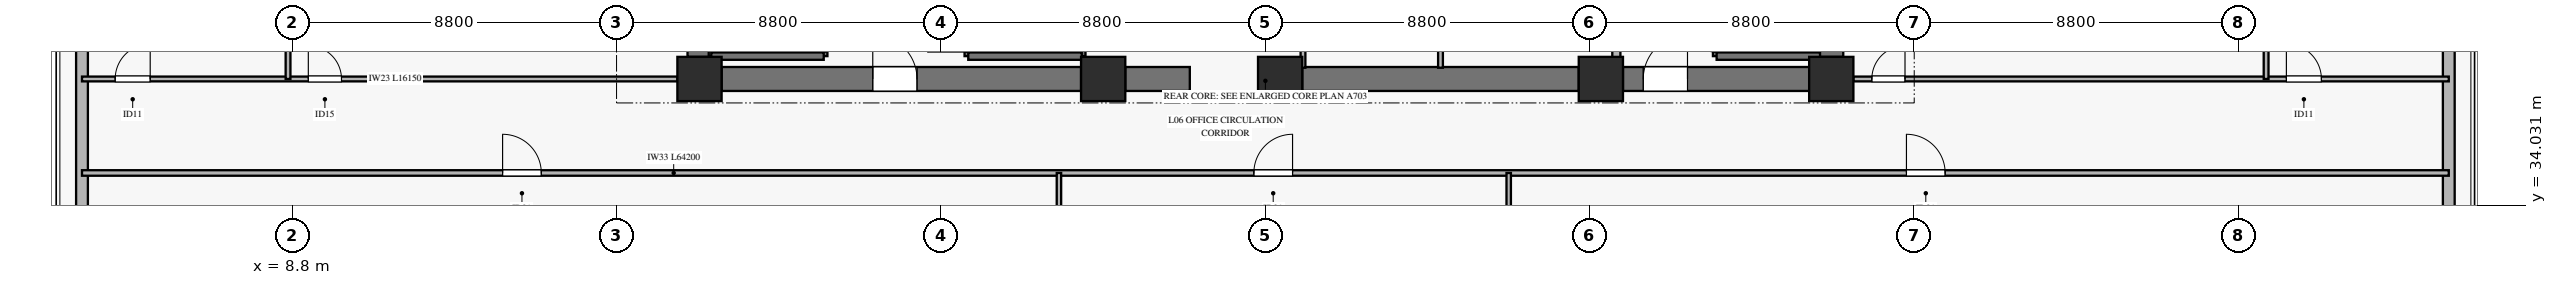
"""IFC4 building model, lengths in metres.
Left out: names, types, materials, properties, quantities, classifications, styles, units other than length and angle.
Written with IfcOpenShell. Run it as: python <this file> out.ifc"""

import sys

from ifc_helpers import new_model, si_unit, direction, frame, frame_2d, origin, origin_2d, place, context, subcontext, project, spatial, rectangle, extrude, source, transform, mapped, element, fill, save


model = new_model("IFC4")
c1 = context("Model", 3, precision=1e-05, world=origin(), true_north=direction((0.0, 1.0)))
c2 = subcontext(c1, "Body", "Model", "MODEL_VIEW")
j1 = project(units=[si_unit("LENGTHUNIT", "METRE"), si_unit("PLANEANGLEUNIT", "RADIAN")], contexts=[c1])
p1 = place(None, origin())
s1 = spatial("IfcSite", under=j1, at=p1, CompositionType="ELEMENT")
p2 = place(p1, origin())
s2 = spatial("IfcBuilding", under=s1, at=p2, CompositionType="ELEMENT")
p3 = place(p2, frame((0.0, 0.0, 25.4)))
s3 = spatial("IfcBuildingStorey", under=s2, at=p3, CompositionType="ELEMENT", Elevation=25.4)
m1 = source(origin(), c2, "Body", "SweptSolid", [
    extrude(rectangle(XDim=1.2, YDim=1.2, at=origin_2d()), origin(), (0.0, 0.0, 1.0), 3.68),
])
for number, where, z_axis, x_axis in (
    (1, (19.85, 37.45, 0.0), (0.0, 0.0, 1.0), (1.0, 0.0, 0.0)),
    (2, (30.8, 37.45, 0.0), (0.0, 0.0, 1.0), (1.0, 0.0, 0.0)),
    (3, (35.6, 37.45, 0.0), (0.0, 0.0, 1.0), (1.0, 0.0, 0.0)),
    (4, (44.3, 37.45, 0.0), (0.0, 0.0, 1.0), (1.0, 0.0, 0.0)),
    (5, (50.55, 37.45, 0.0), (0.0, 0.0, 1.0), (1.0, 0.0, 0.0)),
):
    element("IfcColumn", number, at=place(p3, frame(where, z_axis=z_axis, x_axis=x_axis)), inside=s3, PredefinedType="PILASTER", context=c2, shape_type="MappedRepresentation", body=[
        mapped(m1, transform((0.0, 0.0, 0.0), x_axis=(1.0, 0.0, 0.0), y_axis=(0.0, 1.0, 0.0), z_axis=(0.0, 0.0, 1.0), scale=1.0)),
    ])
p4 = place(p3, frame((20.45, 37.45, 0.0), z_axis=(0.0, 0.0, 1.0), x_axis=(1.0, 0.0, 0.0)))
e6 = element("IfcWall", 6, at=p4, inside=s3, PredefinedType="SHEAR", context=c2, shape_type="SweptSolid", body=[
    extrude(rectangle(XDim=9.75, YDim=0.65, at=frame_2d((4.875, 0.0))), origin(), (0.0, 0.0, 1.0), 3.68),
])
p5 = place(p4, frame((4.1, 0.0, 0.0)))
e7 = element("IfcOpeningElement", 7, at=p5, cuts=e6, PredefinedType="OPENING", context=c2, shape_type="SweptSolid", body=[
    extrude(rectangle(XDim=1.2, YDim=2.15, at=frame_2d((0.6, 1.075))), frame((0.0, 0.335, 0.0), z_axis=(0.0, -1.0, 0.0), x_axis=(1.0, 0.0, 0.0)), (0.0, 0.0, 1.0), 0.67),
])
p6 = place(p3, frame((31.4, 37.45, 0.0), z_axis=(0.0, 0.0, 1.0), x_axis=(1.0, 0.0, 0.0)))
e8 = element("IfcWall", 8, at=p6, inside=s3, PredefinedType="SHEAR", context=c2, shape_type="SweptSolid", body=[
    extrude(rectangle(XDim=1.75, YDim=0.65, at=frame_2d((0.875, 0.0))), origin(), (0.0, 0.0, 1.0), 3.68),
])
p7 = place(p3, frame((36.2, 37.45, 0.0), z_axis=(0.0, 0.0, 1.0), x_axis=(1.0, 0.0, 0.0)))
e9 = element("IfcWall", 9, at=p7, inside=s3, PredefinedType="SHEAR", context=c2, shape_type="SweptSolid", body=[
    extrude(rectangle(XDim=7.5, YDim=0.65, at=frame_2d((3.75, 0.0))), origin(), (0.0, 0.0, 1.0), 3.68),
])
p8 = place(p3, frame((44.9, 37.45, 0.0), z_axis=(0.0, 0.0, 1.0), x_axis=(1.0, 0.0, 0.0)))
e10 = element("IfcWall", 10, at=p8, inside=s3, PredefinedType="SHEAR", context=c2, shape_type="SweptSolid", body=[
    extrude(rectangle(XDim=5.05, YDim=0.65, at=frame_2d((2.525, 0.0))), origin(), (0.0, 0.0, 1.0), 3.68),
])
p9 = place(p8, frame((0.55, 0.0, 0.0)))
e11 = element("IfcOpeningElement", 11, at=p9, cuts=e10, PredefinedType="OPENING", context=c2, shape_type="SweptSolid", body=[
    extrude(rectangle(XDim=1.2, YDim=2.15, at=frame_2d((0.6, 1.075))), frame((0.0, 0.335, 0.0), z_axis=(0.0, -1.0, 0.0), x_axis=(1.0, 0.0, 0.0)), (0.0, 0.0, 1.0), 0.67),
])
for number, where, z_axis, x_axis in (
    (12, (19.85, 38.05, 0.0), (0.0, 0.0, 1.0), (0.0, 1.0, 0.0)),
    (13, (50.55, 38.05, 0.0), (0.0, 0.0, 1.0), (0.0, 1.0, 0.0)),
):
    element("IfcWall", number, at=place(p3, frame(where, z_axis=z_axis, x_axis=x_axis)), inside=s3, PredefinedType="SHEAR", context=c2, shape_type="SweptSolid", body=[
        extrude(rectangle(XDim=7.9, YDim=0.65, at=frame_2d((3.95, 0.0))), origin(), (0.0, 0.0, 1.0), 3.68),
    ])
p10 = place(p3, frame((3.1, 25.25, 0.0), z_axis=(0.0, 0.0, 1.0), x_axis=(0.0, 1.0, 0.0)))
e14 = element("IfcWall", 14, at=p10, inside=s3, PredefinedType="SOLIDWALL", context=c2, shape_type="SweptSolid", body=[
    extrude(rectangle(XDim=17.65, YDim=0.32, at=frame_2d((8.825, 0.0))), origin(), (0.0, 0.0, 1.0), 3.16),
])
p11 = place(p10, frame((4.436, 0.0, 0.45)))
e15 = element("IfcOpeningElement", 15, at=p11, cuts=e14, PredefinedType="OPENING", context=c2, shape_type="SweptSolid", body=[
    extrude(rectangle(XDim=2.4, YDim=2.1, at=frame_2d((1.2, 1.05))), frame((0.0, 0.17, 0.0), z_axis=(0.0, -1.0, 0.0), x_axis=(1.0, 0.0, 0.0)), (0.0, 0.0, 1.0), 0.34),
])
p12 = place(p3, frame((67.3, 25.25, 0.0), z_axis=(0.0, 0.0, 1.0), x_axis=(0.0, 1.0, 0.0)))
e16 = element("IfcWall", 16, at=p12, inside=s3, PredefinedType="SOLIDWALL", context=c2, shape_type="SweptSolid", body=[
    extrude(rectangle(XDim=17.65, YDim=0.32, at=frame_2d((8.825, 0.0))), origin(), (0.0, 0.0, 1.0), 3.16),
])
p13 = place(p12, frame((4.436, 0.0, 0.45)))
e17 = element("IfcOpeningElement", 17, at=p13, cuts=e16, PredefinedType="OPENING", context=c2, shape_type="SweptSolid", body=[
    extrude(rectangle(XDim=2.4, YDim=2.1, at=frame_2d((1.2, 1.05))), frame((0.0, 0.17, 0.0), z_axis=(0.0, -1.0, 0.0), x_axis=(1.0, 0.0, 0.0)), (0.0, 0.0, 1.0), 0.34),
])
p14 = place(p3, frame((20.17, 38.07, 0.0), z_axis=(0.0, 0.0, 1.0), x_axis=(0.0, 1.0, 0.0)))
e18 = element("IfcWall", 18, at=p14, inside=s3, PredefinedType="SOLIDWALL", context=c2, shape_type="SweptSolid", body=[
    extrude(rectangle(XDim=7.25, YDim=0.14, at=frame_2d((3.625, 0.0))), origin(), (0.0, 0.0, 1.0), 3.9),
])
p15 = place(p3, frame((23.22, 38.07, 0.0), z_axis=(0.0, 0.0, 1.0), x_axis=(0.0, 1.0, 0.0)))
e19 = element("IfcWall", 19, at=p15, inside=s3, PredefinedType="SOLIDWALL", context=c2, shape_type="SweptSolid", body=[
    extrude(rectangle(XDim=7.25, YDim=0.2, at=frame_2d((3.625, 0.0))), origin(), (0.0, 0.0, 1.0), 3.9),
])
p16 = place(p15, frame((0.11, 0.0, 0.0)))
e20 = element("IfcOpeningElement", 20, at=p16, cuts=e19, PredefinedType="OPENING", context=c2, shape_type="SweptSolid", body=[
    extrude(rectangle(XDim=1.1, YDim=2.15, at=frame_2d((0.55, 1.075))), frame((0.0, 0.11, 0.0), z_axis=(0.0, -1.0, 0.0), x_axis=(1.0, 0.0, 0.0)), (0.0, 0.0, 1.0), 0.22),
])
p17 = place(p3, frame((20.17, 38.07, 0.0), z_axis=(0.0, 0.0, 1.0), x_axis=(1.0, 0.0, 0.0)))
e21 = element("IfcWall", 21, at=p17, inside=s3, PredefinedType="SOLIDWALL", context=c2, shape_type="SweptSolid", body=[
    extrude(rectangle(XDim=3.05, YDim=0.2, at=frame_2d((1.525, 0.0))), origin(), (0.0, 0.0, 1.0), 3.9),
])
p18 = place(p3, frame((27.14, 38.07, 0.0), z_axis=(0.0, 0.0, 1.0), x_axis=(0.0, 1.0, 0.0)))
e22 = element("IfcWall", 22, at=p18, inside=s3, PredefinedType="SOLIDWALL", context=c2, shape_type="SweptSolid", body=[
    extrude(rectangle(XDim=7.25, YDim=0.2, at=frame_2d((3.625, 0.0))), origin(), (0.0, 0.0, 1.0), 3.9),
])
p19 = place(p18, frame((0.11, 0.0, 0.0)))
e23 = element("IfcOpeningElement", 23, at=p19, cuts=e22, PredefinedType="OPENING", context=c2, shape_type="SweptSolid", body=[
    extrude(rectangle(XDim=1.1, YDim=2.15, at=frame_2d((0.55, 1.075))), frame((0.0, 0.11, 0.0), z_axis=(0.0, -1.0, 0.0), x_axis=(1.0, 0.0, 0.0)), (0.0, 0.0, 1.0), 0.22),
])
p20 = place(p3, frame((30.22, 38.07, 0.0), z_axis=(0.0, 0.0, 1.0), x_axis=(0.0, 1.0, 0.0)))
e24 = element("IfcWall", 24, at=p20, inside=s3, PredefinedType="SOLIDWALL", context=c2, shape_type="SweptSolid", body=[
    extrude(rectangle(XDim=7.25, YDim=0.2, at=frame_2d((3.625, 0.0))), origin(), (0.0, 0.0, 1.0), 3.9),
])
p21 = place(p3, frame((27.14, 38.07, 0.0), z_axis=(0.0, 0.0, 1.0), x_axis=(1.0, 0.0, 0.0)))
e25 = element("IfcWall", 25, at=p21, inside=s3, PredefinedType="SOLIDWALL", context=c2, shape_type="SweptSolid", body=[
    extrude(rectangle(XDim=3.08, YDim=0.2, at=frame_2d((1.54, 0.0))), origin(), (0.0, 0.0, 1.0), 3.9),
])
p22 = place(p3, frame((47.44, 38.07, 0.0), z_axis=(0.0, 0.0, 1.0), x_axis=(0.0, 1.0, 0.0)))
e26 = element("IfcWall", 26, at=p22, inside=s3, PredefinedType="SOLIDWALL", context=c2, shape_type="SweptSolid", body=[
    extrude(rectangle(XDim=7.25, YDim=0.2, at=frame_2d((3.625, 0.0))), origin(), (0.0, 0.0, 1.0), 3.9),
])
p23 = place(p22, frame((0.11, 0.0, 0.0)))
e27 = element("IfcOpeningElement", 27, at=p23, cuts=e26, PredefinedType="OPENING", context=c2, shape_type="SweptSolid", body=[
    extrude(rectangle(XDim=1.1, YDim=2.15, at=frame_2d((0.55, 1.075))), frame((0.0, 0.11, 0.0), z_axis=(0.0, -1.0, 0.0), x_axis=(1.0, 0.0, 0.0)), (0.0, 0.0, 1.0), 0.22),
])
p24 = place(p3, frame((47.44, 38.07, 0.0), z_axis=(0.0, 0.0, 1.0), x_axis=(1.0, 0.0, 0.0)))
e28 = element("IfcWall", 28, at=p24, inside=s3, PredefinedType="SOLIDWALL", context=c2, shape_type="SweptSolid", body=[
    extrude(rectangle(XDim=2.805, YDim=0.2, at=frame_2d((1.403, 0.0))), origin(), (0.0, 0.0, 1.0), 3.9),
])
p25 = place(p3, frame((44.72, 37.755, 0.0), z_axis=(0.0, 0.0, 1.0), x_axis=(0.0, 1.0, 0.0)))
e29 = element("IfcWall", 29, at=p25, inside=s3, PredefinedType="SOLIDWALL", context=c2, shape_type="SweptSolid", body=[
    extrude(rectangle(XDim=7.465, YDim=0.22, at=frame_2d((3.732, 0.0))), origin(), (0.0, 0.0, 1.0), 3.68),
])
p26 = place(p3, frame((36.22, 37.755, 0.0), z_axis=(0.0, 0.0, 1.0), x_axis=(0.0, 1.0, 0.0)))
e30 = element("IfcWall", 30, at=p26, inside=s3, PredefinedType="PARTITIONING", context=c2, shape_type="SweptSolid", body=[
    extrude(rectangle(XDim=2.165, YDim=0.13, at=frame_2d((1.083, 0.0))), origin(), (0.0, 0.0, 1.0), 3.68),
])
p27 = place(p26, frame((0.855, 0.0, 0.0)))
e31 = element("IfcOpeningElement", 31, at=p27, cuts=e30, PredefinedType="OPENING", context=c2, shape_type="SweptSolid", body=[
    extrude(rectangle(XDim=0.9, YDim=2.1, at=frame_2d((0.45, 1.05))), frame((0.0, 0.075, 0.0), z_axis=(0.0, -1.0, 0.0), x_axis=(1.0, 0.0, 0.0)), (0.0, 0.0, 1.0), 0.15),
])
p28 = place(p3, frame((39.95, 37.755, 0.0), z_axis=(0.0, 0.0, 1.0), x_axis=(0.0, 1.0, 0.0)))
e32 = element("IfcWall", 32, at=p28, inside=s3, PredefinedType="PARTITIONING", context=c2, shape_type="SweptSolid", body=[
    extrude(rectangle(XDim=2.165, YDim=0.13, at=frame_2d((1.083, 0.0))), origin(), (0.0, 0.0, 1.0), 3.68),
])
p29 = place(p28, frame((0.565, 0.0, 0.0)))
e33 = element("IfcOpeningElement", 33, at=p29, cuts=e32, PredefinedType="OPENING", context=c2, shape_type="SweptSolid", body=[
    extrude(rectangle(XDim=0.9, YDim=2.1, at=frame_2d((0.45, 1.05))), frame((0.0, 0.075, 0.0), z_axis=(0.0, -1.0, 0.0), x_axis=(1.0, 0.0, 0.0)), (0.0, 0.0, 1.0), 0.15),
])
p30 = place(p3, frame((3.1, 34.9, 0.0), z_axis=(0.0, 0.0, 1.0), x_axis=(1.0, 0.0, 0.0)))
e34 = element("IfcWall", 34, at=p30, inside=s3, PredefinedType="PARTITIONING", context=c2, shape_type="SweptSolid", body=[
    extrude(rectangle(XDim=64.2, YDim=0.15, at=frame_2d((32.1, 0.0))), origin(), (0.0, 0.0, 1.0), 2.765),
])
p31 = place(p30, frame((11.409, 0.0, 0.0)))
e35 = element("IfcOpeningElement", 35, at=p31, cuts=e34, PredefinedType="OPENING", context=c2, shape_type="SweptSolid", body=[
    extrude(rectangle(XDim=1.05, YDim=2.15, at=frame_2d((0.525, 1.075))), frame((0.0, 0.085, 0.0), z_axis=(0.0, -1.0, 0.0), x_axis=(1.0, 0.0, 0.0)), (0.0, 0.0, 1.0), 0.17),
])
p32 = place(p30, frame((31.787, 0.0, 0.0)))
e36 = element("IfcOpeningElement", 36, at=p32, cuts=e34, PredefinedType="OPENING", context=c2, shape_type="SweptSolid", body=[
    extrude(rectangle(XDim=1.05, YDim=2.15, at=frame_2d((0.525, 1.075))), frame((0.0, 0.085, 0.0), z_axis=(0.0, -1.0, 0.0), x_axis=(1.0, 0.0, 0.0)), (0.0, 0.0, 1.0), 0.17),
])
p33 = place(p30, frame((49.489, 0.0, 0.0)))
e37 = element("IfcOpeningElement", 37, at=p33, cuts=e34, PredefinedType="OPENING", context=c2, shape_type="SweptSolid", body=[
    extrude(rectangle(XDim=1.05, YDim=2.15, at=frame_2d((0.525, 1.075))), frame((0.0, 0.085, 0.0), z_axis=(0.0, -1.0, 0.0), x_axis=(1.0, 0.0, 0.0)), (0.0, 0.0, 1.0), 0.17),
])
for number, where, z_axis, x_axis in (
    (38, (29.6, 3.3, 0.0), (0.0, 0.0, 1.0), (0.0, 1.0, 0.0)),
    (39, (41.8, 3.3, 0.0), (0.0, 0.0, 1.0), (0.0, 1.0, 0.0)),
):
    element("IfcWall", number, at=place(p3, frame(where, z_axis=z_axis, x_axis=x_axis)), inside=s3, PredefinedType="PARTITIONING", context=c2, shape_type="SweptSolid", body=[
        extrude(rectangle(XDim=31.6, YDim=0.12, at=frame_2d((15.8, 0.0))), origin(), (0.0, 0.0, 1.0), 3.165),
    ])
p34 = place(p3, frame((3.1, 37.45, 0.0), z_axis=(0.0, 0.0, 1.0), x_axis=(1.0, 0.0, 0.0)))
e40 = element("IfcWall", 40, at=p34, inside=s3, PredefinedType="PARTITIONING", context=c2, shape_type="SweptSolid", body=[
    extrude(rectangle(XDim=16.15, YDim=0.13, at=frame_2d((8.075, 0.0))), origin(), (0.0, 0.0, 1.0), 3.165),
])
p35 = place(p34, frame((0.9, 0.0, 0.0)))
e41 = element("IfcOpeningElement", 41, at=p35, cuts=e40, PredefinedType="OPENING", context=c2, shape_type="SweptSolid", body=[
    extrude(rectangle(XDim=0.95, YDim=2.1, at=frame_2d((0.475, 1.05))), frame((0.0, 0.075, 0.0), z_axis=(0.0, -1.0, 0.0), x_axis=(1.0, 0.0, 0.0)), (0.0, 0.0, 1.0), 0.15),
])
p36 = place(p34, frame((6.139, 0.0, 0.0)))
e42 = element("IfcOpeningElement", 42, at=p36, cuts=e40, PredefinedType="OPENING", context=c2, shape_type="SweptSolid", body=[
    extrude(rectangle(XDim=0.9, YDim=2.1, at=frame_2d((0.45, 1.05))), frame((0.0, 0.075, 0.0), z_axis=(0.0, -1.0, 0.0), x_axis=(1.0, 0.0, 0.0)), (0.0, 0.0, 1.0), 0.15),
])
p37 = place(p3, frame((8.689, 37.45, 0.0), z_axis=(0.0, 0.0, 1.0), x_axis=(0.0, 1.0, 0.0)))
e43 = element("IfcWall", 43, at=p37, inside=s3, PredefinedType="PARTITIONING", context=c2, shape_type="SweptSolid", body=[
    extrude(rectangle(XDim=8.8, YDim=0.13, at=frame_2d((4.4, 0.0))), origin(), (0.0, 0.0, 1.0), 3.68),
])
p38 = place(p3, frame((51.15, 37.45, 0.0), z_axis=(0.0, 0.0, 1.0), x_axis=(1.0, 0.0, 0.0)))
e44 = element("IfcWall", 44, at=p38, inside=s3, PredefinedType="PARTITIONING", context=c2, shape_type="SweptSolid", body=[
    extrude(rectangle(XDim=16.15, YDim=0.13, at=frame_2d((8.075, 0.0))), origin(), (0.0, 0.0, 1.0), 3.165),
])
p39 = place(p38, frame((0.5, 0.0, 0.0)))
e45 = element("IfcOpeningElement", 45, at=p39, cuts=e44, PredefinedType="OPENING", context=c2, shape_type="SweptSolid", body=[
    extrude(rectangle(XDim=0.9, YDim=2.1, at=frame_2d((0.45, 1.05))), frame((0.0, 0.075, 0.0), z_axis=(0.0, -1.0, 0.0), x_axis=(1.0, 0.0, 0.0)), (0.0, 0.0, 1.0), 0.15),
])
p40 = place(p38, frame((11.745, 0.0, 0.0)))
e46 = element("IfcOpeningElement", 46, at=p40, cuts=e44, PredefinedType="OPENING", context=c2, shape_type="SweptSolid", body=[
    extrude(rectangle(XDim=0.95, YDim=2.1, at=frame_2d((0.475, 1.05))), frame((0.0, 0.075, 0.0), z_axis=(0.0, -1.0, 0.0), x_axis=(1.0, 0.0, 0.0)), (0.0, 0.0, 1.0), 0.15),
])
p41 = place(p3, frame((62.345, 37.45, 0.0), z_axis=(0.0, 0.0, 1.0), x_axis=(0.0, 1.0, 0.0)))
e47 = element("IfcWall", 47, at=p41, inside=s3, PredefinedType="PARTITIONING", context=c2, shape_type="SweptSolid", body=[
    extrude(rectangle(XDim=8.8, YDim=0.13, at=frame_2d((4.4, 0.0))), origin(), (0.0, 0.0, 1.0), 3.68),
])
m2 = source(origin(), c2, "Body", "SweptSolid", [
    extrude(rectangle(XDim=1.2, YDim=2.15, at=frame_2d((0.6, 1.075))), frame((0.0, 0.025, 0.0), z_axis=(0.0, -1.0, 0.0), x_axis=(1.0, 0.0, 0.0)), (0.0, 0.0, 1.0), 0.05),
])
p42 = place(p5, origin())
e48 = element("IfcDoor", 48, at=p42, inside=s3, OperationType="SINGLE_SWING_LEFT", PredefinedType="DOOR", context=c2, shape_type="MappedRepresentation", body=[
    mapped(m2, transform((0.0, 0.0, 0.0), x_axis=(1.0, 0.0, 0.0), y_axis=(0.0, 1.0, 0.0), z_axis=(0.0, 0.0, 1.0), scale=1.0)),
])
fill(e7, e48)
p43 = place(p9, origin())
e49 = element("IfcDoor", 49, at=p43, inside=s3, OperationType="SINGLE_SWING_RIGHT", PredefinedType="DOOR", context=c2, shape_type="MappedRepresentation", body=[
    mapped(m2, transform((0.0, 0.0, 0.0), x_axis=(1.0, 0.0, 0.0), y_axis=(0.0, 1.0, 0.0), z_axis=(0.0, 0.0, 1.0), scale=1.0)),
])
fill(e11, e49)
m3 = source(origin(), c2, "Body", "SweptSolid", [
    extrude(rectangle(XDim=1.05, YDim=2.15, at=frame_2d((0.525, 1.075))), frame((0.0, 0.025, 0.0), z_axis=(0.0, -1.0, 0.0), x_axis=(1.0, 0.0, 0.0)), (0.0, 0.0, 1.0), 0.05),
])
p44 = place(p31, origin())
e50 = element("IfcDoor", 50, at=p44, inside=s3, OperationType="SINGLE_SWING_LEFT", PredefinedType="DOOR", context=c2, shape_type="MappedRepresentation", body=[
    mapped(m3, transform((0.0, 0.0, 0.0), x_axis=(1.0, 0.0, 0.0), y_axis=(0.0, 1.0, 0.0), z_axis=(0.0, 0.0, 1.0), scale=1.0)),
])
fill(e35, e50)
p45 = place(p32, origin())
e51 = element("IfcDoor", 51, at=p45, inside=s3, OperationType="SINGLE_SWING_RIGHT", PredefinedType="DOOR", context=c2, shape_type="MappedRepresentation", body=[
    mapped(m3, transform((0.0, 0.0, 0.0), x_axis=(1.0, 0.0, 0.0), y_axis=(0.0, 1.0, 0.0), z_axis=(0.0, 0.0, 1.0), scale=1.0)),
])
fill(e36, e51)
p46 = place(p33, origin())
e52 = element("IfcDoor", 52, at=p46, inside=s3, OperationType="SINGLE_SWING_LEFT", PredefinedType="DOOR", context=c2, shape_type="MappedRepresentation", body=[
    mapped(m3, transform((0.0, 0.0, 0.0), x_axis=(1.0, 0.0, 0.0), y_axis=(0.0, 1.0, 0.0), z_axis=(0.0, 0.0, 1.0), scale=1.0)),
])
fill(e37, e52)
m4 = source(origin(), c2, "Body", "SweptSolid", [
    extrude(rectangle(XDim=0.95, YDim=2.1, at=frame_2d((0.475, 1.05))), frame((0.0, 0.025, 0.0), z_axis=(0.0, -1.0, 0.0), x_axis=(1.0, 0.0, 0.0)), (0.0, 0.0, 1.0), 0.05),
])
p47 = place(p35, origin())
e53 = element("IfcDoor", 53, at=p47, inside=s3, OperationType="SINGLE_SWING_RIGHT", PredefinedType="DOOR", context=c2, shape_type="MappedRepresentation", body=[
    mapped(m4, transform((0.0, 0.0, 0.0), x_axis=(1.0, 0.0, 0.0), y_axis=(0.0, 1.0, 0.0), z_axis=(0.0, 0.0, 1.0), scale=1.0)),
])
fill(e41, e53)
m5 = source(origin(), c2, "Body", "SweptSolid", [
    extrude(rectangle(XDim=0.9, YDim=2.1, at=frame_2d((0.45, 1.05))), frame((0.0, 0.025, 0.0), z_axis=(0.0, -1.0, 0.0), x_axis=(1.0, 0.0, 0.0)), (0.0, 0.0, 1.0), 0.05),
])
p48 = place(p36, origin())
e54 = element("IfcDoor", 54, at=p48, inside=s3, OperationType="SINGLE_SWING_LEFT", PredefinedType="DOOR", context=c2, shape_type="MappedRepresentation", body=[
    mapped(m5, transform((0.0, 0.0, 0.0), x_axis=(1.0, 0.0, 0.0), y_axis=(0.0, 1.0, 0.0), z_axis=(0.0, 0.0, 1.0), scale=1.0)),
])
fill(e42, e54)
p49 = place(p39, origin())
e55 = element("IfcDoor", 55, at=p49, inside=s3, OperationType="SINGLE_SWING_RIGHT", PredefinedType="DOOR", context=c2, shape_type="MappedRepresentation", body=[
    mapped(m5, transform((0.0, 0.0, 0.0), x_axis=(1.0, 0.0, 0.0), y_axis=(0.0, 1.0, 0.0), z_axis=(0.0, 0.0, 1.0), scale=1.0)),
])
fill(e45, e55)
p50 = place(p40, origin())
e56 = element("IfcDoor", 56, at=p50, inside=s3, OperationType="SINGLE_SWING_LEFT", PredefinedType="DOOR", context=c2, shape_type="MappedRepresentation", body=[
    mapped(m4, transform((0.0, 0.0, 0.0), x_axis=(1.0, 0.0, 0.0), y_axis=(0.0, 1.0, 0.0), z_axis=(0.0, 0.0, 1.0), scale=1.0)),
])
fill(e46, e56)
save(model, sys.argv[1])
